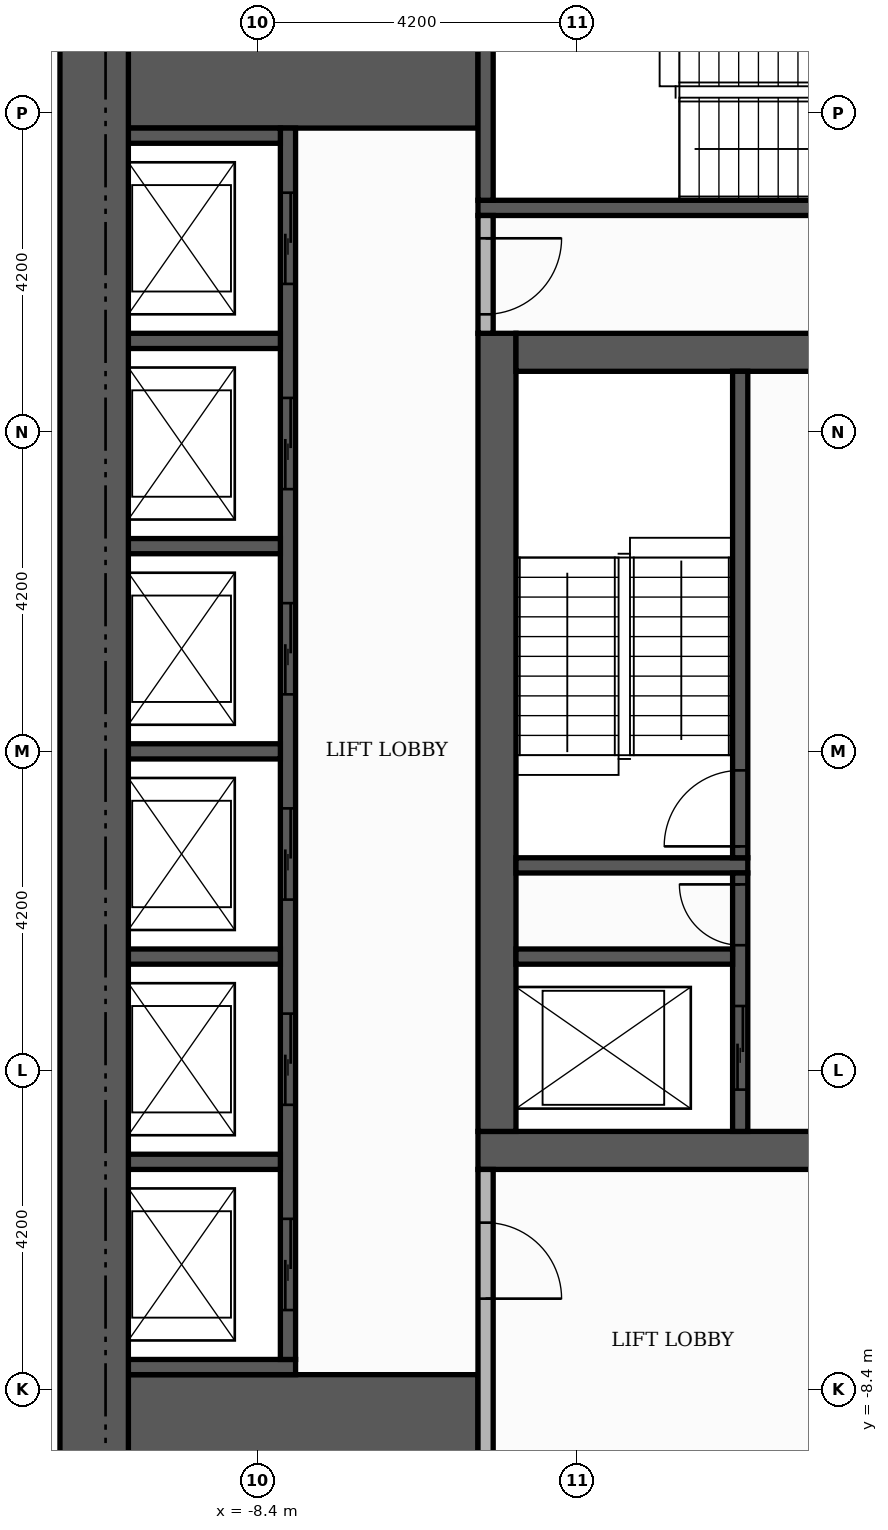
"""IFC4 building model, lengths in metres.
Left out: names, types, materials, properties, quantities, classifications, styles, units other than length and angle.
Written with IfcOpenShell. Run it as: python <this file> out.ifc"""

import sys

from ifc_helpers import new_model, si_unit, direction, frame, frame_2d, origin, place, context, subcontext, project, spatial, rectangle, extrude, element, fill, save


model = new_model("IFC4")
c1 = context("Model", 3, precision=1e-05, world=origin(), true_north=direction((0.0, 1.0)))
c2 = subcontext(c1, "Body", "Model", "MODEL_VIEW")
j1 = project(units=[si_unit("LENGTHUNIT", "METRE"), si_unit("PLANEANGLEUNIT", "RADIAN")], contexts=[c1])
p1 = place(None, origin())
s1 = spatial("IfcSite", under=j1, at=p1, CompositionType="ELEMENT")
p2 = place(p1, origin())
s2 = spatial("IfcBuilding", under=s1, at=p2, CompositionType="ELEMENT")
p3 = place(p2, frame((0.0, 0.0, 34.8)))
s3 = spatial("IfcBuildingStorey", under=s2, at=p3, CompositionType="ELEMENT", Elevation=34.8)
p4 = place(p3, frame((-5.5, -5.25, 0.0), z_axis=(0.0, 0.0, 1.0), x_axis=(1.0, 0.0, 0.0)))
e1 = element("IfcWall", 1, at=p4, inside=s3, PredefinedType="SHEAR", context=c2, shape_type="SweptSolid", body=[
    extrude(rectangle(XDim=11.0, YDim=0.5, at=frame_2d((5.5, 0.0))), origin(), (0.0, 0.0, 1.0), 3.48),
])
p5 = place(p4, frame((4.9, 0.0, 0.0)))
e2 = element("IfcOpeningElement", 2, at=p5, cuts=e1, PredefinedType="OPENING", context=c2, shape_type="SweptSolid", body=[
    extrude(rectangle(XDim=1.2, YDim=2.1, at=frame_2d((0.6, 1.05))), frame((0.0, 0.26, 0.0), z_axis=(0.0, -1.0, 0.0), x_axis=(1.0, 0.0, 0.0)), (0.0, 0.0, 1.0), 0.52),
])
p6 = place(p3, frame((-5.25, -5.0, 0.0), z_axis=(0.0, 0.0, 1.0), x_axis=(0.0, 1.0, 0.0)))
e3 = element("IfcWall", 3, at=p6, inside=s3, PredefinedType="SHEAR", context=c2, shape_type="SweptSolid", body=[
    extrude(rectangle(XDim=10.5, YDim=0.5, at=frame_2d((5.25, 0.0))), origin(), (0.0, 0.0, 1.0), 3.48),
])
p7 = place(p3, frame((-5.0, 5.25, 0.0), z_axis=(0.0, 0.0, 1.0), x_axis=(1.0, 0.0, 0.0)))
e4 = element("IfcWall", 4, at=p7, inside=s3, PredefinedType="SHEAR", context=c2, shape_type="SweptSolid", body=[
    extrude(rectangle(XDim=10.0, YDim=0.5, at=frame_2d((5.0, 0.0))), origin(), (0.0, 0.0, 1.0), 3.48),
])
p8 = place(p7, frame((4.4, 0.0, 0.0)))
e5 = element("IfcOpeningElement", 5, at=p8, cuts=e4, PredefinedType="OPENING", context=c2, shape_type="SweptSolid", body=[
    extrude(rectangle(XDim=1.2, YDim=2.1, at=frame_2d((0.6, 1.05))), frame((0.0, 0.26, 0.0), z_axis=(0.0, -1.0, 0.0), x_axis=(1.0, 0.0, 0.0)), (0.0, 0.0, 1.0), 0.52),
])
for number, where, z_axis, x_axis in (
    (6, (-10.1, -9.15, 0.0), (0.0, 0.0, 1.0), (1.0, 0.0, 0.0)),
    (7, (-10.1, 9.15, 0.0), (0.0, 0.0, 1.0), (1.0, 0.0, 0.0)),
):
    element("IfcWall", number, at=place(p3, frame(where, z_axis=z_axis, x_axis=x_axis)), inside=s3, PredefinedType="SHEAR", context=c2, shape_type="SweptSolid", body=[
        extrude(rectangle(XDim=4.6, YDim=1.9, at=frame_2d((2.3, 0.0))), origin(), (0.0, 0.0, 1.0), 3.48),
    ])
p9 = place(p3, frame((-5.0, -1.5, 0.0), z_axis=(0.0, 0.0, 1.0), x_axis=(1.0, 0.0, 0.0)))
e8 = element("IfcWall", 8, at=p9, inside=s3, PredefinedType="SHEAR", context=c2, shape_type="SweptSolid", body=[
    extrude(rectangle(XDim=3.05, YDim=0.2, at=frame_2d((1.525, 0.0))), origin(), (0.0, 0.0, 1.0), 3.48),
])
p10 = place(p3, frame((-2.05, -1.4, 0.0), z_axis=(0.0, 0.0, 1.0), x_axis=(0.0, 1.0, 0.0)))
e9 = element("IfcWall", 9, at=p10, inside=s3, PredefinedType="SHEAR", context=c2, shape_type="SweptSolid", body=[
    extrude(rectangle(XDim=6.4, YDim=0.2, at=frame_2d((3.2, 0.0))), origin(), (0.0, 0.0, 1.0), 3.48),
])
p11 = place(p10, frame((0.15, 0.0, 0.0)))
e10 = element("IfcOpeningElement", 10, at=p11, cuts=e9, PredefinedType="OPENING", context=c2, shape_type="SweptSolid", body=[
    extrude(rectangle(XDim=1.0, YDim=2.1, at=frame_2d((0.5, 1.05))), frame((0.0, 0.11, 0.0), z_axis=(0.0, -1.0, 0.0), x_axis=(1.0, 0.0, 0.0)), (0.0, 0.0, 1.0), 0.22),
])
p12 = place(p3, frame((-5.5, 7.15, 0.0), z_axis=(0.0, 0.0, 1.0), x_axis=(1.0, 0.0, 0.0)))
e11 = element("IfcWall", 11, at=p12, inside=s3, PredefinedType="SHEAR", context=c2, shape_type="SweptSolid", body=[
    extrude(rectangle(XDim=6.8, YDim=0.2, at=frame_2d((3.4, 0.0))), origin(), (0.0, 0.0, 1.0), 3.48),
])
p13 = place(p3, frame((-5.4, 7.25, 0.0), z_axis=(0.0, 0.0, 1.0), x_axis=(0.0, 1.0, 0.0)))
e12 = element("IfcWall", 12, at=p13, inside=s3, PredefinedType="SHEAR", context=c2, shape_type="SweptSolid", body=[
    extrude(rectangle(XDim=2.85, YDim=0.2, at=frame_2d((1.425, 0.0))), origin(), (0.0, 0.0, 1.0), 3.48),
])
p14 = place(p3, frame((-10.1, -8.1, 0.0), z_axis=(0.0, 0.0, 1.0), x_axis=(1.0, 0.0, 0.0)))
e13 = element("IfcWall", 13, at=p14, inside=s3, PredefinedType="SHEAR", context=c2, shape_type="SweptSolid", body=[
    extrude(rectangle(XDim=2.2, YDim=0.2, at=frame_2d((1.1, 0.0))), origin(), (0.0, 0.0, 1.0), 3.48),
])
p15 = place(p3, frame((-8.0, -8.0, 0.0), z_axis=(0.0, 0.0, 1.0), x_axis=(0.0, 1.0, 0.0)))
e14 = element("IfcWall", 14, at=p15, inside=s3, PredefinedType="SHEAR", context=c2, shape_type="SweptSolid", body=[
    extrude(rectangle(XDim=16.2, YDim=0.2, at=frame_2d((8.1, 0.0))), origin(), (0.0, 0.0, 1.0), 3.48),
])
p16 = place(p15, frame((0.65, 0.0, 0.0)))
e15 = element("IfcOpeningElement", 15, at=p16, cuts=e14, PredefinedType="OPENING", context=c2, shape_type="SweptSolid", body=[
    extrude(rectangle(XDim=1.2, YDim=2.1, at=frame_2d((0.6, 1.05))), frame((0.0, 0.11, 0.0), z_axis=(0.0, -1.0, 0.0), x_axis=(1.0, 0.0, 0.0)), (0.0, 0.0, 1.0), 0.22),
])
p17 = place(p15, frame((3.35, 0.0, 0.0)))
e16 = element("IfcOpeningElement", 16, at=p17, cuts=e14, PredefinedType="OPENING", context=c2, shape_type="SweptSolid", body=[
    extrude(rectangle(XDim=1.2, YDim=2.1, at=frame_2d((0.6, 1.05))), frame((0.0, 0.11, 0.0), z_axis=(0.0, -1.0, 0.0), x_axis=(1.0, 0.0, 0.0)), (0.0, 0.0, 1.0), 0.22),
])
p18 = place(p15, frame((6.05, 0.0, 0.0)))
e17 = element("IfcOpeningElement", 17, at=p18, cuts=e14, PredefinedType="OPENING", context=c2, shape_type="SweptSolid", body=[
    extrude(rectangle(XDim=1.2, YDim=2.1, at=frame_2d((0.6, 1.05))), frame((0.0, 0.11, 0.0), z_axis=(0.0, -1.0, 0.0), x_axis=(1.0, 0.0, 0.0)), (0.0, 0.0, 1.0), 0.22),
])
p19 = place(p15, frame((8.75, 0.0, 0.0)))
e18 = element("IfcOpeningElement", 18, at=p19, cuts=e14, PredefinedType="OPENING", context=c2, shape_type="SweptSolid", body=[
    extrude(rectangle(XDim=1.2, YDim=2.1, at=frame_2d((0.6, 1.05))), frame((0.0, 0.11, 0.0), z_axis=(0.0, -1.0, 0.0), x_axis=(1.0, 0.0, 0.0)), (0.0, 0.0, 1.0), 0.22),
])
p20 = place(p15, frame((11.45, 0.0, 0.0)))
e19 = element("IfcOpeningElement", 19, at=p20, cuts=e14, PredefinedType="OPENING", context=c2, shape_type="SweptSolid", body=[
    extrude(rectangle(XDim=1.2, YDim=2.1, at=frame_2d((0.6, 1.05))), frame((0.0, 0.11, 0.0), z_axis=(0.0, -1.0, 0.0), x_axis=(1.0, 0.0, 0.0)), (0.0, 0.0, 1.0), 0.22),
])
p21 = place(p15, frame((14.15, 0.0, 0.0)))
e20 = element("IfcOpeningElement", 20, at=p21, cuts=e14, PredefinedType="OPENING", context=c2, shape_type="SweptSolid", body=[
    extrude(rectangle(XDim=1.2, YDim=2.1, at=frame_2d((0.6, 1.05))), frame((0.0, 0.11, 0.0), z_axis=(0.0, -1.0, 0.0), x_axis=(1.0, 0.0, 0.0)), (0.0, 0.0, 1.0), 0.22),
])
p22 = place(p3, frame((-10.1, -5.4, 0.0), z_axis=(0.0, 0.0, 1.0), x_axis=(1.0, 0.0, 0.0)))
e21 = element("IfcWall", 21, at=p22, inside=s3, PredefinedType="SHEAR", context=c2, shape_type="SweptSolid", body=[
    extrude(rectangle(XDim=2.0, YDim=0.2, at=frame_2d((1.0, 0.0))), origin(), (0.0, 0.0, 1.0), 3.48),
])
p23 = place(p3, frame((-2.05, -5.0, 0.0), z_axis=(0.0, 0.0, 1.0), x_axis=(0.0, 1.0, 0.0)))
e22 = element("IfcWall", 22, at=p23, inside=s3, PredefinedType="SHEAR", context=c2, shape_type="SweptSolid", body=[
    extrude(rectangle(XDim=3.4, YDim=0.2, at=frame_2d((1.7, 0.0))), origin(), (0.0, 0.0, 1.0), 3.48),
])
p24 = place(p23, frame((0.55, 0.0, 0.0)))
e23 = element("IfcOpeningElement", 23, at=p24, cuts=e22, PredefinedType="OPENING", context=c2, shape_type="SweptSolid", body=[
    extrude(rectangle(XDim=1.1, YDim=2.1, at=frame_2d((0.55, 1.05))), frame((0.0, 0.11, 0.0), z_axis=(0.0, -1.0, 0.0), x_axis=(1.0, 0.0, 0.0)), (0.0, 0.0, 1.0), 0.22),
])
p25 = place(p23, frame((2.45, 0.0, 0.0)))
e24 = element("IfcOpeningElement", 24, at=p25, cuts=e22, PredefinedType="OPENING", context=c2, shape_type="SweptSolid", body=[
    extrude(rectangle(XDim=0.8, YDim=2.1, at=frame_2d((0.4, 1.05))), frame((0.0, 0.11, 0.0), z_axis=(0.0, -1.0, 0.0), x_axis=(1.0, 0.0, 0.0)), (0.0, 0.0, 1.0), 0.22),
])
p26 = place(p3, frame((-10.1, -2.7, 0.0), z_axis=(0.0, 0.0, 1.0), x_axis=(1.0, 0.0, 0.0)))
e25 = element("IfcWall", 25, at=p26, inside=s3, PredefinedType="SHEAR", context=c2, shape_type="SweptSolid", body=[
    extrude(rectangle(XDim=2.0, YDim=0.2, at=frame_2d((1.0, 0.0))), origin(), (0.0, 0.0, 1.0), 3.48),
])
p27 = place(p3, frame((-5.0, -2.7, 0.0), z_axis=(0.0, 0.0, 1.0), x_axis=(1.0, 0.0, 0.0)))
e26 = element("IfcWall", 26, at=p27, inside=s3, PredefinedType="SHEAR", context=c2, shape_type="SweptSolid", body=[
    extrude(rectangle(XDim=2.85, YDim=0.2, at=frame_2d((1.425, 0.0))), origin(), (0.0, 0.0, 1.0), 3.48),
])
for number, where, z_axis, x_axis in (
    (27, (-10.1, 0.0, 0.0), (0.0, 0.0, 1.0), (1.0, 0.0, 0.0)),
    (28, (-10.1, 2.7, 0.0), (0.0, 0.0, 1.0), (1.0, 0.0, 0.0)),
    (29, (-10.1, 5.4, 0.0), (0.0, 0.0, 1.0), (1.0, 0.0, 0.0)),
    (30, (-10.1, 8.1, 0.0), (0.0, 0.0, 1.0), (1.0, 0.0, 0.0)),
):
    element("IfcWall", number, at=place(p3, frame(where, z_axis=z_axis, x_axis=x_axis)), inside=s3, PredefinedType="SHEAR", context=c2, shape_type="SweptSolid", body=[
        extrude(rectangle(XDim=2.0, YDim=0.2, at=frame_2d((1.0, 0.0))), origin(), (0.0, 0.0, 1.0), 3.48),
    ])
p28 = place(p3, frame((-10.55, -10.1, 0.0), z_axis=(0.0, 0.0, 1.0), x_axis=(0.0, 1.0, 0.0)))
e31 = element("IfcWall", 31, at=p28, inside=s3, PredefinedType="SHEAR", context=c2, shape_type="SweptSolid", body=[
    extrude(rectangle(XDim=20.2, YDim=0.9, at=frame_2d((10.1, 0.0))), origin(), (0.0, 0.0, 1.0), 3.48),
])
p29 = place(p3, frame((-5.4, -10.1, 0.0), z_axis=(0.0, 0.0, 1.0), x_axis=(0.0, 1.0, 0.0)))
e32 = element("IfcWall", 32, at=p29, inside=s3, PredefinedType="PARTITIONING", context=c2, shape_type="SweptSolid", body=[
    extrude(rectangle(XDim=4.6, YDim=0.2, at=frame_2d((2.3, 0.0))), origin(), (0.0, 0.0, 1.0), 3.48),
])
p30 = place(p29, frame((2.9, 0.0, 0.0)))
e33 = element("IfcOpeningElement", 33, at=p30, cuts=e32, PredefinedType="OPENING", context=c2, shape_type="SweptSolid", body=[
    extrude(rectangle(XDim=1.0, YDim=2.1, at=frame_2d((0.5, 1.05))), frame((0.0, 0.11, 0.0), z_axis=(0.0, -1.0, 0.0), x_axis=(1.0, 0.0, 0.0)), (0.0, 0.0, 1.0), 0.22),
])
p31 = place(p3, frame((-5.4, 5.5, 0.0), z_axis=(0.0, 0.0, 1.0), x_axis=(0.0, 1.0, 0.0)))
e34 = element("IfcWall", 34, at=p31, inside=s3, PredefinedType="PARTITIONING", context=c2, shape_type="SweptSolid", body=[
    extrude(rectangle(XDim=1.55, YDim=0.2, at=frame_2d((0.775, 0.0))), origin(), (0.0, 0.0, 1.0), 3.48),
])
p32 = place(p31, frame((0.25, 0.0, 0.0)))
e35 = element("IfcOpeningElement", 35, at=p32, cuts=e34, PredefinedType="OPENING", context=c2, shape_type="SweptSolid", body=[
    extrude(rectangle(XDim=1.0, YDim=2.1, at=frame_2d((0.5, 1.05))), frame((0.0, 0.11, 0.0), z_axis=(0.0, -1.0, 0.0), x_axis=(1.0, 0.0, 0.0)), (0.0, 0.0, 1.0), 0.22),
])
p33 = place(p16, origin())
e36 = element("IfcDoor", 36, at=p33, inside=s3, OperationType="SLIDING_TO_LEFT", PredefinedType="DOOR", context=c2, shape_type="SweptSolid", body=[
    extrude(rectangle(XDim=1.2, YDim=2.1, at=frame_2d((0.6, 1.05))), frame((0.0, 0.025, 0.0), z_axis=(0.0, -1.0, 0.0), x_axis=(1.0, 0.0, 0.0)), (0.0, 0.0, 1.0), 0.05),
])
fill(e15, e36)
p34 = place(p17, origin())
e37 = element("IfcDoor", 37, at=p34, inside=s3, OperationType="SLIDING_TO_LEFT", PredefinedType="DOOR", context=c2, shape_type="SweptSolid", body=[
    extrude(rectangle(XDim=1.2, YDim=2.1, at=frame_2d((0.6, 1.05))), frame((0.0, 0.025, 0.0), z_axis=(0.0, -1.0, 0.0), x_axis=(1.0, 0.0, 0.0)), (0.0, 0.0, 1.0), 0.05),
])
fill(e16, e37)
p35 = place(p18, origin())
e38 = element("IfcDoor", 38, at=p35, inside=s3, OperationType="SLIDING_TO_LEFT", PredefinedType="DOOR", context=c2, shape_type="SweptSolid", body=[
    extrude(rectangle(XDim=1.2, YDim=2.1, at=frame_2d((0.6, 1.05))), frame((0.0, 0.025, 0.0), z_axis=(0.0, -1.0, 0.0), x_axis=(1.0, 0.0, 0.0)), (0.0, 0.0, 1.0), 0.05),
])
fill(e17, e38)
p36 = place(p19, origin())
e39 = element("IfcDoor", 39, at=p36, inside=s3, OperationType="SLIDING_TO_LEFT", PredefinedType="DOOR", context=c2, shape_type="SweptSolid", body=[
    extrude(rectangle(XDim=1.2, YDim=2.1, at=frame_2d((0.6, 1.05))), frame((0.0, 0.025, 0.0), z_axis=(0.0, -1.0, 0.0), x_axis=(1.0, 0.0, 0.0)), (0.0, 0.0, 1.0), 0.05),
])
fill(e18, e39)
p37 = place(p20, origin())
e40 = element("IfcDoor", 40, at=p37, inside=s3, OperationType="SLIDING_TO_LEFT", PredefinedType="DOOR", context=c2, shape_type="SweptSolid", body=[
    extrude(rectangle(XDim=1.2, YDim=2.1, at=frame_2d((0.6, 1.05))), frame((0.0, 0.025, 0.0), z_axis=(0.0, -1.0, 0.0), x_axis=(1.0, 0.0, 0.0)), (0.0, 0.0, 1.0), 0.05),
])
fill(e19, e40)
p38 = place(p21, origin())
e41 = element("IfcDoor", 41, at=p38, inside=s3, OperationType="SLIDING_TO_LEFT", PredefinedType="DOOR", context=c2, shape_type="SweptSolid", body=[
    extrude(rectangle(XDim=1.2, YDim=2.1, at=frame_2d((0.6, 1.05))), frame((0.0, 0.025, 0.0), z_axis=(0.0, -1.0, 0.0), x_axis=(1.0, 0.0, 0.0)), (0.0, 0.0, 1.0), 0.05),
])
fill(e20, e41)
p39 = place(p24, origin())
e42 = element("IfcDoor", 42, at=p39, inside=s3, OperationType="SLIDING_TO_LEFT", PredefinedType="DOOR", context=c2, shape_type="SweptSolid", body=[
    extrude(rectangle(XDim=1.1, YDim=2.1, at=frame_2d((0.55, 1.05))), frame((0.0, 0.025, 0.0), z_axis=(0.0, -1.0, 0.0), x_axis=(1.0, 0.0, 0.0)), (0.0, 0.0, 1.0), 0.05),
])
fill(e23, e42)
p40 = place(p11, origin())
e43 = element("IfcDoor", 43, at=p40, inside=s3, OperationType="SINGLE_SWING_LEFT", PredefinedType="DOOR", context=c2, shape_type="SweptSolid", body=[
    extrude(rectangle(XDim=1.0, YDim=2.1, at=frame_2d((0.5, 1.05))), frame((0.0, 0.025, 0.0), z_axis=(0.0, -1.0, 0.0), x_axis=(1.0, 0.0, 0.0)), (0.0, 0.0, 1.0), 0.05),
])
fill(e10, e43)
p41 = place(p25, origin())
e44 = element("IfcDoor", 44, at=p41, inside=s3, OperationType="SINGLE_SWING_RIGHT", PredefinedType="DOOR", context=c2, shape_type="SweptSolid", body=[
    extrude(rectangle(XDim=0.8, YDim=2.1, at=frame_2d((0.4, 1.05))), frame((0.0, 0.025, 0.0), z_axis=(0.0, -1.0, 0.0), x_axis=(1.0, 0.0, 0.0)), (0.0, 0.0, 1.0), 0.05),
])
fill(e24, e44)
p42 = place(p32, frame((1.0, 0.0, 0.0), z_axis=(0.0, 0.0, 1.0), x_axis=(-1.0, 0.0, 0.0)))
e45 = element("IfcDoor", 45, at=p42, inside=s3, OperationType="SINGLE_SWING_RIGHT", PredefinedType="DOOR", context=c2, shape_type="SweptSolid", body=[
    extrude(rectangle(XDim=1.0, YDim=2.1, at=frame_2d((0.5, 1.05))), frame((0.0, 0.025, 0.0), z_axis=(0.0, -1.0, 0.0), x_axis=(1.0, 0.0, 0.0)), (0.0, 0.0, 1.0), 0.05),
])
fill(e35, e45)
p43 = place(p30, frame((1.0, 0.0, 0.0), z_axis=(0.0, 0.0, 1.0), x_axis=(-1.0, 0.0, 0.0)))
e46 = element("IfcDoor", 46, at=p43, inside=s3, OperationType="SINGLE_SWING_LEFT", PredefinedType="DOOR", context=c2, shape_type="SweptSolid", body=[
    extrude(rectangle(XDim=1.0, YDim=2.1, at=frame_2d((0.5, 1.05))), frame((0.0, 0.025, 0.0), z_axis=(0.0, -1.0, 0.0), x_axis=(1.0, 0.0, 0.0)), (0.0, 0.0, 1.0), 0.05),
])
fill(e33, e46)
save(model, sys.argv[1])
